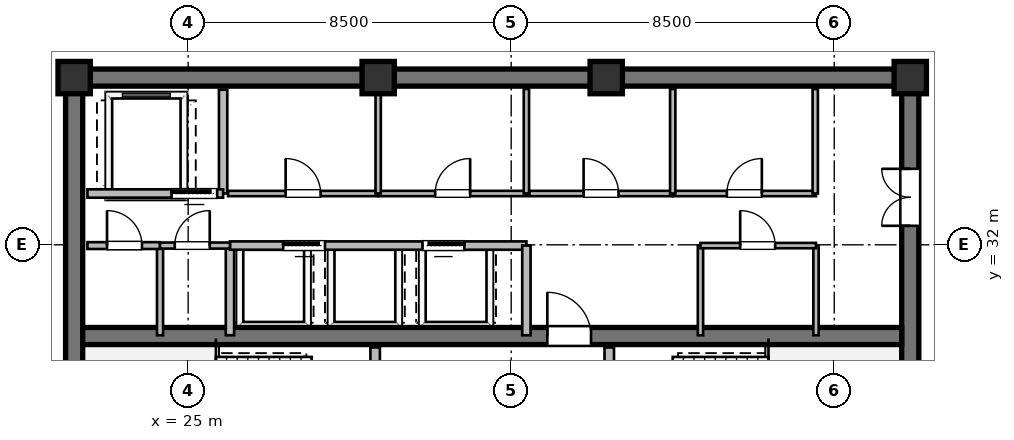
"""IFC4 building model, lengths in metres.
Left out: names, types, materials, properties, quantities, classifications, styles, units other than length and angle.
Written with IfcOpenShell. Run it as: python <this file> out.ifc"""

import sys

from ifc_helpers import new_model, si_unit, direction, frame, frame_2d, origin, origin_2d, place, context, subcontext, project, spatial, rectangle, extrude, element, fill, save


model = new_model("IFC4")
c1 = context("Model", 3, precision=1e-05, world=origin(), true_north=direction((0.0, 1.0)))
c2 = subcontext(c1, "Body", "Model", "MODEL_VIEW")
j1 = project(units=[si_unit("LENGTHUNIT", "METRE"), si_unit("PLANEANGLEUNIT", "RADIAN")], contexts=[c1])
p1 = place(None, origin())
s1 = spatial("IfcSite", under=j1, at=p1, CompositionType="ELEMENT")
p2 = place(p1, origin())
s2 = spatial("IfcBuilding", under=s1, at=p2, CompositionType="ELEMENT")
p3 = place(p2, frame((0.0, 0.0, 235.2)))
s3 = spatial("IfcBuildingStorey", under=s2, at=p3, CompositionType="ELEMENT", Elevation=235.2)
p4 = place(p3, frame((21.775, 36.4, 0.0), z_axis=(0.0, 0.0, 1.0), x_axis=(1.0, 0.0, 0.0)))
e1 = element("IfcWall", 1, at=p4, inside=s3, PredefinedType="SHEAR", context=c2, shape_type="SweptSolid", body=[
    extrude(rectangle(XDim=22.45, YDim=0.45, at=frame_2d((11.225, 0.0))), origin(), (0.0, 0.0, 1.0), 3.36),
])
p5 = place(p3, frame((22.0, 23.825, 0.0), z_axis=(0.0, 0.0, 1.0), x_axis=(0.0, 1.0, 0.0)))
e2 = element("IfcWall", 2, at=p5, inside=s3, PredefinedType="SHEAR", context=c2, shape_type="SweptSolid", body=[
    extrude(rectangle(XDim=12.35, YDim=0.45, at=frame_2d((6.175, 0.0))), origin(), (0.0, 0.0, 1.0), 3.36),
])
p6 = place(p3, frame((44.0, 23.825, 0.0), z_axis=(0.0, 0.0, 1.0), x_axis=(0.0, 1.0, 0.0)))
e3 = element("IfcWall", 3, at=p6, inside=s3, PredefinedType="SHEAR", context=c2, shape_type="SweptSolid", body=[
    extrude(rectangle(XDim=12.35, YDim=0.45, at=frame_2d((6.175, 0.0))), origin(), (0.0, 0.0, 1.0), 3.36),
])
p7 = place(p6, frame((8.675, 0.0, 0.0)))
e4 = element("IfcOpeningElement", 4, at=p7, cuts=e3, PredefinedType="OPENING", context=c2, shape_type="SweptSolid", body=[
    extrude(rectangle(XDim=1.5, YDim=2.15, at=frame_2d((0.75, 1.075))), frame((0.0, 0.235, 0.0), z_axis=(0.0, -1.0, 0.0), x_axis=(1.0, 0.0, 0.0)), (0.0, 0.0, 1.0), 0.47),
])
p8 = place(p3, frame((22.225, 29.6, 0.0), z_axis=(0.0, 0.0, 1.0), x_axis=(1.0, 0.0, 0.0)))
e5 = element("IfcWall", 5, at=p8, inside=s3, PredefinedType="SHEAR", context=c2, shape_type="SweptSolid", body=[
    extrude(rectangle(XDim=21.55, YDim=0.45, at=frame_2d((10.775, 0.0))), origin(), (0.0, 0.0, 1.0), 3.36),
])
p9 = place(p8, frame((12.225, 0.0, 0.0)))
e6 = element("IfcOpeningElement", 6, at=p9, cuts=e5, PredefinedType="OPENING", context=c2, shape_type="SweptSolid", body=[
    extrude(rectangle(XDim=1.15, YDim=2.1, at=frame_2d((0.575, 1.05))), frame((0.0, 0.235, 0.0), z_axis=(0.0, -1.0, 0.0), x_axis=(1.0, 0.0, 0.0)), (0.0, 0.0, 1.0), 0.47),
])
for number, where, z_axis, x_axis in (
    (7, (44.0, 36.4, 0.0), (0.0, 0.0, 1.0), (1.0, 0.0, 0.0)),
    (8, (36.0, 36.4, 0.0), (0.0, 0.0, 1.0), (1.0, 0.0, 0.0)),
    (9, (30.0, 36.4, 0.0), (0.0, 0.0, 1.0), (1.0, 0.0, 0.0)),
    (10, (22.0, 36.4, 0.0), (0.0, 0.0, 1.0), (1.0, 0.0, 0.0)),
):
    element("IfcColumn", number, at=place(p3, frame(where, z_axis=z_axis, x_axis=x_axis)), inside=s3, PredefinedType="COLUMN", context=c2, shape_type="SweptSolid", body=[
        extrude(rectangle(XDim=0.85, YDim=0.85, at=origin_2d()), origin(), (0.0, 0.0, 1.0), 3.6),
    ])
p10 = place(p3, frame((29.92, 23.9, 0.0), z_axis=(0.0, 0.0, 1.0), x_axis=(0.0, 1.0, 0.0)))
e11 = element("IfcWall", 11, at=p10, inside=s3, PredefinedType="SOLIDWALL", context=c2, shape_type="SweptSolid", body=[
    extrude(rectangle(XDim=5.4, YDim=0.25, at=frame_2d((2.7, 0.0))), origin(), (0.0, 0.0, 1.0), 3.36),
])
p11 = place(p10, frame((3.421, 0.0, 0.0)))
e12 = element("IfcOpeningElement", 12, at=p11, cuts=e11, PredefinedType="OPENING", context=c2, shape_type="SweptSolid", body=[
    extrude(rectangle(XDim=1.15, YDim=2.1, at=frame_2d((0.575, 1.05))), frame((0.0, 0.135, 0.0), z_axis=(0.0, -1.0, 0.0), x_axis=(1.0, 0.0, 0.0)), (0.0, 0.0, 1.0), 0.27),
])
p12 = place(p3, frame((36.08, 23.9, 0.0), z_axis=(0.0, 0.0, 1.0), x_axis=(0.0, 1.0, 0.0)))
e13 = element("IfcWall", 13, at=p12, inside=s3, PredefinedType="SOLIDWALL", context=c2, shape_type="SweptSolid", body=[
    extrude(rectangle(XDim=5.4, YDim=0.25, at=frame_2d((2.7, 0.0))), origin(), (0.0, 0.0, 1.0), 3.36),
])
p13 = place(p12, frame((3.421, 0.0, 0.0)))
e14 = element("IfcOpeningElement", 14, at=p13, cuts=e13, PredefinedType="OPENING", context=c2, shape_type="SweptSolid", body=[
    extrude(rectangle(XDim=1.15, YDim=2.1, at=frame_2d((0.575, 1.05))), frame((0.0, 0.135, 0.0), z_axis=(0.0, -1.0, 0.0), x_axis=(1.0, 0.0, 0.0)), (0.0, 0.0, 1.0), 0.27),
])
p14 = place(p3, frame((25.92, 33.35, 0.0), z_axis=(0.0, 0.0, 1.0), x_axis=(0.0, 1.0, 0.0)))
e15 = element("IfcWall", 15, at=p14, inside=s3, PredefinedType="SOLIDWALL", context=c2, shape_type="SweptSolid", body=[
    extrude(rectangle(XDim=2.73, YDim=0.22, at=frame_2d((1.365, 0.0))), origin(), (0.0, 0.0, 1.0), 3.36),
])
p15 = place(p3, frame((22.35, 33.35, 0.0), z_axis=(0.0, 0.0, 1.0), x_axis=(1.0, 0.0, 0.0)))
e16 = element("IfcWall", 16, at=p15, inside=s3, PredefinedType="SOLIDWALL", context=c2, shape_type="SweptSolid", body=[
    extrude(rectangle(XDim=3.57, YDim=0.22, at=frame_2d((1.785, 0.0))), origin(), (0.0, 0.0, 1.0), 3.36),
])
p16 = place(p15, frame((2.213, 0.0, 0.0)))
e17 = element("IfcOpeningElement", 17, at=p16, cuts=e16, PredefinedType="OPENING", context=c2, shape_type="SweptSolid", body=[
    extrude(rectangle(XDim=1.2, YDim=2.1, at=frame_2d((0.6, 1.05))), frame((0.0, 0.12, 0.0), z_axis=(0.0, -1.0, 0.0), x_axis=(1.0, 0.0, 0.0)), (0.0, 0.0, 1.0), 0.24),
])
p17 = place(p3, frame((26.1, 29.62, 0.0), z_axis=(0.0, 0.0, 1.0), x_axis=(0.0, 1.0, 0.0)))
e18 = element("IfcWall", 18, at=p17, inside=s3, PredefinedType="SOLIDWALL", context=c2, shape_type="SweptSolid", body=[
    extrude(rectangle(XDim=2.36, YDim=0.22, at=frame_2d((1.18, 0.0))), origin(), (0.0, 0.0, 1.0), 3.36),
])
p18 = place(p3, frame((26.1, 31.98, 0.0), z_axis=(0.0, 0.0, 1.0), x_axis=(1.0, 0.0, 0.0)))
e19 = element("IfcWall", 19, at=p18, inside=s3, PredefinedType="SOLIDWALL", context=c2, shape_type="SweptSolid", body=[
    extrude(rectangle(XDim=7.8, YDim=0.22, at=frame_2d((3.9, 0.0))), origin(), (0.0, 0.0, 1.0), 3.36),
])
p19 = place(p18, frame((1.4, 0.0, 0.0)))
e20 = element("IfcOpeningElement", 20, at=p19, cuts=e19, PredefinedType="OPENING", context=c2, shape_type="SweptSolid", body=[
    extrude(rectangle(XDim=1.1, YDim=2.1, at=frame_2d((0.55, 1.05))), frame((0.0, 0.12, 0.0), z_axis=(0.0, -1.0, 0.0), x_axis=(1.0, 0.0, 0.0)), (0.0, 0.0, 1.0), 0.24),
])
p20 = place(p18, frame((5.066, 0.0, 0.0)))
e21 = element("IfcOpeningElement", 21, at=p20, cuts=e19, PredefinedType="OPENING", context=c2, shape_type="SweptSolid", body=[
    extrude(rectangle(XDim=1.1, YDim=2.1, at=frame_2d((0.55, 1.05))), frame((0.0, 0.12, 0.0), z_axis=(0.0, -1.0, 0.0), x_axis=(1.0, 0.0, 0.0)), (0.0, 0.0, 1.0), 0.24),
])
p21 = place(p3, frame((33.9, 29.62, 0.0), z_axis=(0.0, 0.0, 1.0), x_axis=(0.0, 1.0, 0.0)))
e22 = element("IfcWall", 22, at=p21, inside=s3, PredefinedType="SOLIDWALL", context=c2, shape_type="SweptSolid", body=[
    extrude(rectangle(XDim=2.36, YDim=0.22, at=frame_2d((1.18, 0.0))), origin(), (0.0, 0.0, 1.0), 3.36),
])
p22 = place(p3, frame((26.05, 33.35, 0.0), z_axis=(0.0, 0.0, 1.0), x_axis=(1.0, 0.0, 0.0)))
e23 = element("IfcWall", 23, at=p22, inside=s3, PredefinedType="PARTITIONING", context=c2, shape_type="SweptSolid", body=[
    extrude(rectangle(XDim=3.95, YDim=0.14, at=frame_2d((1.975, 0.0))), origin(), (0.0, 0.0, 1.0), 3.36),
])
p23 = place(p22, frame((1.515, 0.0, 0.0)))
e24 = element("IfcOpeningElement", 24, at=p23, cuts=e23, PredefinedType="OPENING", context=c2, shape_type="SweptSolid", body=[
    extrude(rectangle(XDim=0.92, YDim=2.1, at=frame_2d((0.46, 1.05))), frame((0.0, 0.08, 0.0), z_axis=(0.0, -1.0, 0.0), x_axis=(1.0, 0.0, 0.0)), (0.0, 0.0, 1.0), 0.16),
])
p24 = place(p3, frame((30.0, 33.35, 0.0), z_axis=(0.0, 0.0, 1.0), x_axis=(1.0, 0.0, 0.0)))
e25 = element("IfcWall", 25, at=p24, inside=s3, PredefinedType="PARTITIONING", context=c2, shape_type="SweptSolid", body=[
    extrude(rectangle(XDim=3.92, YDim=0.14, at=frame_2d((1.96, 0.0))), origin(), (0.0, 0.0, 1.0), 3.36),
])
p25 = place(p24, frame((1.5, 0.0, 0.0)))
e26 = element("IfcOpeningElement", 26, at=p25, cuts=e25, PredefinedType="OPENING", context=c2, shape_type="SweptSolid", body=[
    extrude(rectangle(XDim=0.92, YDim=2.1, at=frame_2d((0.46, 1.05))), frame((0.0, 0.08, 0.0), z_axis=(0.0, -1.0, 0.0), x_axis=(1.0, 0.0, 0.0)), (0.0, 0.0, 1.0), 0.16),
])
for number, where, z_axis, x_axis in (
    (27, (30.0, 33.35, 0.0), (0.0, 0.0, 1.0), (0.0, 1.0, 0.0)),
    (28, (33.9, 33.35, 0.0), (0.0, 0.0, 1.0), (0.0, 1.0, 0.0)),
):
    element("IfcWall", number, at=place(p3, frame(where, z_axis=z_axis, x_axis=x_axis)), inside=s3, PredefinedType="PARTITIONING", context=c2, shape_type="SweptSolid", body=[
        extrude(rectangle(XDim=2.75, YDim=0.14, at=frame_2d((1.375, 0.0))), origin(), (0.0, 0.0, 1.0), 3.36),
    ])
p26 = place(p3, frame((33.98, 33.35, 0.0), z_axis=(0.0, 0.0, 1.0), x_axis=(1.0, 0.0, 0.0)))
e29 = element("IfcWall", 29, at=p26, inside=s3, PredefinedType="PARTITIONING", context=c2, shape_type="SweptSolid", body=[
    extrude(rectangle(XDim=3.77, YDim=0.14, at=frame_2d((1.885, 0.0))), origin(), (0.0, 0.0, 1.0), 3.36),
])
p27 = place(p26, frame((1.425, 0.0, 0.0)))
e30 = element("IfcOpeningElement", 30, at=p27, cuts=e29, PredefinedType="OPENING", context=c2, shape_type="SweptSolid", body=[
    extrude(rectangle(XDim=0.92, YDim=2.1, at=frame_2d((0.46, 1.05))), frame((0.0, 0.08, 0.0), z_axis=(0.0, -1.0, 0.0), x_axis=(1.0, 0.0, 0.0)), (0.0, 0.0, 1.0), 0.16),
])
p28 = place(p3, frame((37.75, 33.35, 0.0), z_axis=(0.0, 0.0, 1.0), x_axis=(1.0, 0.0, 0.0)))
e31 = element("IfcWall", 31, at=p28, inside=s3, PredefinedType="PARTITIONING", context=c2, shape_type="SweptSolid", body=[
    extrude(rectangle(XDim=3.77, YDim=0.14, at=frame_2d((1.885, 0.0))), origin(), (0.0, 0.0, 1.0), 3.36),
])
p29 = place(p28, frame((1.425, 0.0, 0.0)))
e32 = element("IfcOpeningElement", 32, at=p29, cuts=e31, PredefinedType="OPENING", context=c2, shape_type="SweptSolid", body=[
    extrude(rectangle(XDim=0.92, YDim=2.1, at=frame_2d((0.46, 1.05))), frame((0.0, 0.08, 0.0), z_axis=(0.0, -1.0, 0.0), x_axis=(1.0, 0.0, 0.0)), (0.0, 0.0, 1.0), 0.16),
])
for number, where, z_axis, x_axis in (
    (33, (37.75, 33.35, 0.0), (0.0, 0.0, 1.0), (0.0, 1.0, 0.0)),
    (34, (41.5, 33.35, 0.0), (0.0, 0.0, 1.0), (0.0, 1.0, 0.0)),
):
    element("IfcWall", number, at=place(p3, frame(where, z_axis=z_axis, x_axis=x_axis)), inside=s3, PredefinedType="PARTITIONING", context=c2, shape_type="SweptSolid", body=[
        extrude(rectangle(XDim=2.75, YDim=0.14, at=frame_2d((1.375, 0.0))), origin(), (0.0, 0.0, 1.0), 3.36),
    ])
p30 = place(p3, frame((24.26, 29.62, 0.0), z_axis=(0.0, 0.0, 1.0), x_axis=(0.0, 1.0, 0.0)))
e35 = element("IfcWall", 35, at=p30, inside=s3, PredefinedType="PLUMBINGWALL", context=c2, shape_type="SweptSolid", body=[
    extrude(rectangle(XDim=2.36, YDim=0.16, at=frame_2d((1.18, 0.0))), origin(), (0.0, 0.0, 1.0), 3.36),
])
p31 = place(p3, frame((22.35, 31.98, 0.0), z_axis=(0.0, 0.0, 1.0), x_axis=(1.0, 0.0, 0.0)))
e36 = element("IfcWall", 36, at=p31, inside=s3, PredefinedType="PARTITIONING", context=c2, shape_type="SweptSolid", body=[
    extrude(rectangle(XDim=1.91, YDim=0.18, at=frame_2d((0.955, 0.0))), origin(), (0.0, 0.0, 1.0), 3.36),
])
p32 = place(p31, frame((0.515, 0.0, 0.0)))
e37 = element("IfcOpeningElement", 37, at=p32, cuts=e36, PredefinedType="OPENING", context=c2, shape_type="SweptSolid", body=[
    extrude(rectangle(XDim=0.92, YDim=2.1, at=frame_2d((0.46, 1.05))), frame((0.0, 0.1, 0.0), z_axis=(0.0, -1.0, 0.0), x_axis=(1.0, 0.0, 0.0)), (0.0, 0.0, 1.0), 0.2),
])
p33 = place(p3, frame((24.26, 31.98, 0.0), z_axis=(0.0, 0.0, 1.0), x_axis=(1.0, 0.0, 0.0)))
e38 = element("IfcWall", 38, at=p33, inside=s3, PredefinedType="PLUMBINGWALL", context=c2, shape_type="SweptSolid", body=[
    extrude(rectangle(XDim=1.84, YDim=0.16, at=frame_2d((0.92, 0.0))), origin(), (0.0, 0.0, 1.0), 3.36),
])
p34 = place(p33, frame((0.388, 0.0, 0.0)))
e39 = element("IfcOpeningElement", 39, at=p34, cuts=e38, PredefinedType="OPENING", context=c2, shape_type="SweptSolid", body=[
    extrude(rectangle(XDim=0.92, YDim=2.1, at=frame_2d((0.46, 1.05))), frame((0.0, 0.09, 0.0), z_axis=(0.0, -1.0, 0.0), x_axis=(1.0, 0.0, 0.0)), (0.0, 0.0, 1.0), 0.18),
])
for number, where, z_axis, x_axis in (
    (40, (38.48, 29.62, 0.0), (0.0, 0.0, 1.0), (0.0, 1.0, 0.0)),
    (41, (41.52, 29.62, 0.0), (0.0, 0.0, 1.0), (0.0, 1.0, 0.0)),
):
    element("IfcWall", number, at=place(p3, frame(where, z_axis=z_axis, x_axis=x_axis)), inside=s3, PredefinedType="PARTITIONING", context=c2, shape_type="SweptSolid", body=[
        extrude(rectangle(XDim=2.36, YDim=0.14, at=frame_2d((1.18, 0.0))), origin(), (0.0, 0.0, 1.0), 3.36),
    ])
p35 = place(p3, frame((38.48, 31.98, 0.0), z_axis=(0.0, 0.0, 1.0), x_axis=(1.0, 0.0, 0.0)))
e42 = element("IfcWall", 42, at=p35, inside=s3, PredefinedType="PARTITIONING", context=c2, shape_type="SweptSolid", body=[
    extrude(rectangle(XDim=3.04, YDim=0.14, at=frame_2d((1.52, 0.0))), origin(), (0.0, 0.0, 1.0), 3.36),
])
p36 = place(p35, frame((1.045, 0.0, 0.0)))
e43 = element("IfcOpeningElement", 43, at=p36, cuts=e42, PredefinedType="OPENING", context=c2, shape_type="SweptSolid", body=[
    extrude(rectangle(XDim=0.92, YDim=2.1, at=frame_2d((0.46, 1.05))), frame((0.0, 0.08, 0.0), z_axis=(0.0, -1.0, 0.0), x_axis=(1.0, 0.0, 0.0)), (0.0, 0.0, 1.0), 0.16),
])
p37 = place(p9, origin())
e44 = element("IfcDoor", 44, at=p37, inside=s3, OperationType="SINGLE_SWING_LEFT", PredefinedType="DOOR", context=c2, shape_type="SweptSolid", body=[
    extrude(rectangle(XDim=1.15, YDim=2.1, at=frame_2d((0.575, 1.05))), frame((0.0, 0.025, 0.0), z_axis=(0.0, -1.0, 0.0), x_axis=(1.0, 0.0, 0.0)), (0.0, 0.0, 1.0), 0.05),
])
fill(e6, e44)
p38 = place(p7, origin())
e45 = element("IfcDoor", 45, at=p38, inside=s3, OperationType="DOUBLE_DOOR_SINGLE_SWING", PredefinedType="DOOR", context=c2, shape_type="SweptSolid", body=[
    extrude(rectangle(XDim=1.5, YDim=2.15, at=frame_2d((0.75, 1.075))), frame((0.0, 0.025, 0.0), z_axis=(0.0, -1.0, 0.0), x_axis=(1.0, 0.0, 0.0)), (0.0, 0.0, 1.0), 0.05),
])
fill(e4, e45)
p39 = place(p16, origin())
e46 = element("IfcDoor", 46, at=p39, inside=s3, OperationType="SLIDING_TO_LEFT", PredefinedType="DOOR", context=c2, shape_type="SweptSolid", body=[
    extrude(rectangle(XDim=1.2, YDim=2.1, at=frame_2d((0.6, 1.05))), frame((0.0, 0.025, 0.0), z_axis=(0.0, -1.0, 0.0), x_axis=(1.0, 0.0, 0.0)), (0.0, 0.0, 1.0), 0.05),
])
fill(e17, e46)
p40 = place(p19, origin())
e47 = element("IfcDoor", 47, at=p40, inside=s3, OperationType="SLIDING_TO_LEFT", PredefinedType="DOOR", context=c2, shape_type="SweptSolid", body=[
    extrude(rectangle(XDim=1.1, YDim=2.1, at=frame_2d((0.55, 1.05))), frame((0.0, 0.025, 0.0), z_axis=(0.0, -1.0, 0.0), x_axis=(1.0, 0.0, 0.0)), (0.0, 0.0, 1.0), 0.05),
])
fill(e20, e47)
p41 = place(p20, origin())
e48 = element("IfcDoor", 48, at=p41, inside=s3, OperationType="SLIDING_TO_RIGHT", PredefinedType="DOOR", context=c2, shape_type="SweptSolid", body=[
    extrude(rectangle(XDim=1.1, YDim=2.1, at=frame_2d((0.55, 1.05))), frame((0.0, 0.025, 0.0), z_axis=(0.0, -1.0, 0.0), x_axis=(1.0, 0.0, 0.0)), (0.0, 0.0, 1.0), 0.05),
])
fill(e21, e48)
p42 = place(p23, origin())
e49 = element("IfcDoor", 49, at=p42, inside=s3, OperationType="SINGLE_SWING_LEFT", PredefinedType="DOOR", context=c2, shape_type="SweptSolid", body=[
    extrude(rectangle(XDim=0.92, YDim=2.1, at=frame_2d((0.46, 1.05))), frame((0.0, 0.025, 0.0), z_axis=(0.0, -1.0, 0.0), x_axis=(1.0, 0.0, 0.0)), (0.0, 0.0, 1.0), 0.05),
])
fill(e24, e49)
p43 = place(p25, origin())
e50 = element("IfcDoor", 50, at=p43, inside=s3, OperationType="SINGLE_SWING_RIGHT", PredefinedType="DOOR", context=c2, shape_type="SweptSolid", body=[
    extrude(rectangle(XDim=0.92, YDim=2.1, at=frame_2d((0.46, 1.05))), frame((0.0, 0.025, 0.0), z_axis=(0.0, -1.0, 0.0), x_axis=(1.0, 0.0, 0.0)), (0.0, 0.0, 1.0), 0.05),
])
fill(e26, e50)
p44 = place(p27, origin())
e51 = element("IfcDoor", 51, at=p44, inside=s3, OperationType="SINGLE_SWING_LEFT", PredefinedType="DOOR", context=c2, shape_type="SweptSolid", body=[
    extrude(rectangle(XDim=0.92, YDim=2.1, at=frame_2d((0.46, 1.05))), frame((0.0, 0.025, 0.0), z_axis=(0.0, -1.0, 0.0), x_axis=(1.0, 0.0, 0.0)), (0.0, 0.0, 1.0), 0.05),
])
fill(e30, e51)
p45 = place(p29, origin())
e52 = element("IfcDoor", 52, at=p45, inside=s3, OperationType="SINGLE_SWING_RIGHT", PredefinedType="DOOR", context=c2, shape_type="SweptSolid", body=[
    extrude(rectangle(XDim=0.92, YDim=2.1, at=frame_2d((0.46, 1.05))), frame((0.0, 0.025, 0.0), z_axis=(0.0, -1.0, 0.0), x_axis=(1.0, 0.0, 0.0)), (0.0, 0.0, 1.0), 0.05),
])
fill(e32, e52)
p46 = place(p32, origin())
e53 = element("IfcDoor", 53, at=p46, inside=s3, OperationType="SINGLE_SWING_LEFT", PredefinedType="DOOR", context=c2, shape_type="SweptSolid", body=[
    extrude(rectangle(XDim=0.92, YDim=2.1, at=frame_2d((0.46, 1.05))), frame((0.0, 0.025, 0.0), z_axis=(0.0, -1.0, 0.0), x_axis=(1.0, 0.0, 0.0)), (0.0, 0.0, 1.0), 0.05),
])
fill(e37, e53)
p47 = place(p34, origin())
e54 = element("IfcDoor", 54, at=p47, inside=s3, OperationType="SINGLE_SWING_RIGHT", PredefinedType="DOOR", context=c2, shape_type="SweptSolid", body=[
    extrude(rectangle(XDim=0.92, YDim=2.1, at=frame_2d((0.46, 1.05))), frame((0.0, 0.025, 0.0), z_axis=(0.0, -1.0, 0.0), x_axis=(1.0, 0.0, 0.0)), (0.0, 0.0, 1.0), 0.05),
])
fill(e39, e54)
p48 = place(p36, origin())
e55 = element("IfcDoor", 55, at=p48, inside=s3, OperationType="SINGLE_SWING_LEFT", PredefinedType="DOOR", context=c2, shape_type="SweptSolid", body=[
    extrude(rectangle(XDim=0.92, YDim=2.1, at=frame_2d((0.46, 1.05))), frame((0.0, 0.025, 0.0), z_axis=(0.0, -1.0, 0.0), x_axis=(1.0, 0.0, 0.0)), (0.0, 0.0, 1.0), 0.05),
])
fill(e43, e55)
save(model, sys.argv[1])
